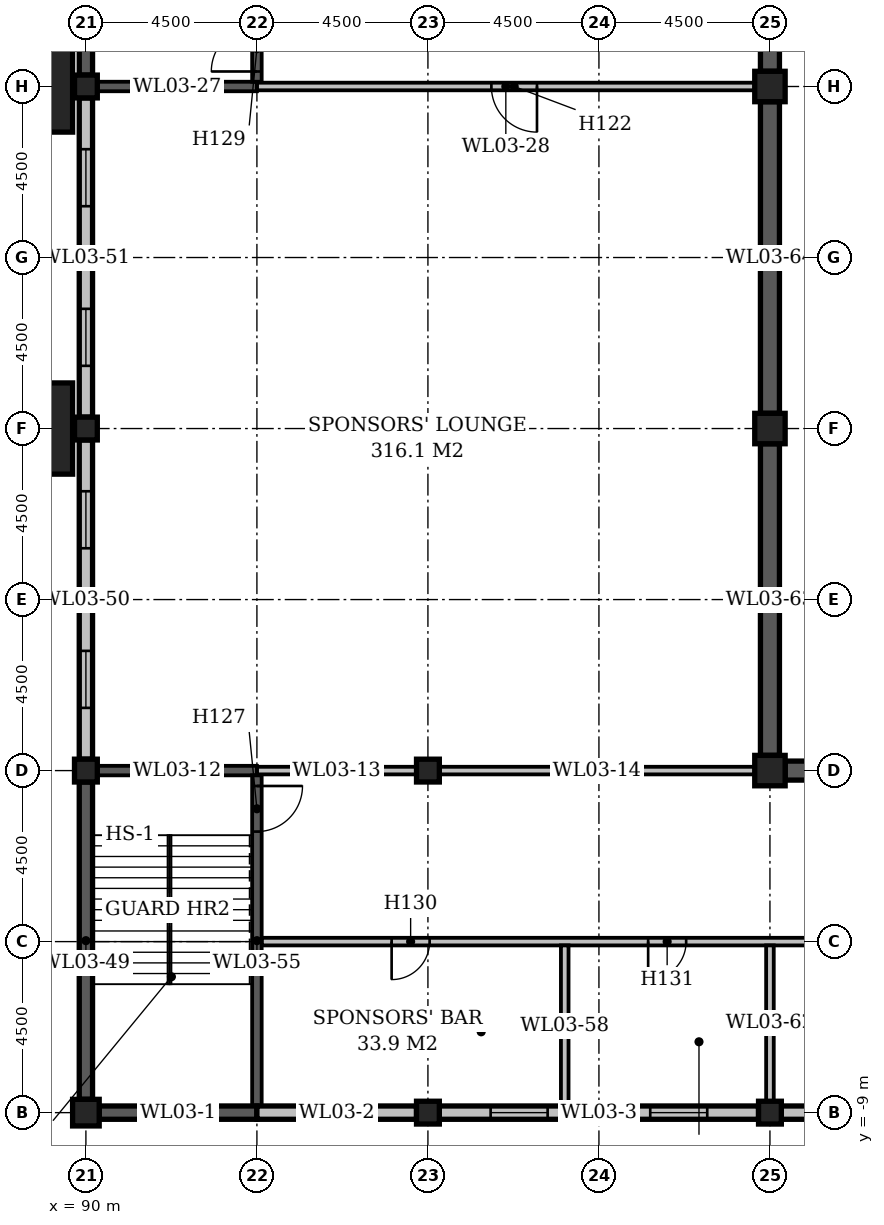
"""IFC4 building model, lengths in metres.
Left out: names, types, materials, properties, quantities, classifications, styles, units other than length and angle.
Written with IfcOpenShell. Run it as: python <this file> out.ifc"""

import sys

from ifc_helpers import new_model, si_unit, direction, frame, frame_2d, origin, origin_2d, place, context, subcontext, project, spatial, rectangle, extrude, element, fill, save


model = new_model("IFC4")
c1 = context("Model", 3, precision=1e-05, world=origin(), true_north=direction((0.0, 1.0)))
c2 = subcontext(c1, "Body", "Model", "MODEL_VIEW")
j1 = project(units=[si_unit("LENGTHUNIT", "METRE"), si_unit("PLANEANGLEUNIT", "RADIAN")], contexts=[c1])
p1 = place(None, origin())
s1 = spatial("IfcSite", under=j1, at=p1, CompositionType="ELEMENT")
p2 = place(p1, origin())
s2 = spatial("IfcBuilding", under=s1, at=p2, CompositionType="ELEMENT")
p3 = place(p2, frame((0.0, 0.0, 19.0)))
s3 = spatial("IfcBuildingStorey", under=s2, at=p3, CompositionType="ELEMENT", Elevation=19.0)
p4 = place(p3, frame((90.0, -9.0, 0.0), z_axis=(0.0, 0.0, 1.0), x_axis=(1.0, 0.0, 0.0)))
e1 = element("IfcColumn", 1, at=p4, inside=s3, PredefinedType="COLUMN", context=c2, shape_type="SweptSolid", body=[
    extrude(rectangle(XDim=0.7, YDim=0.7, at=origin_2d()), origin(), (0.0, 0.0, 1.0), 4.7),
])
for number, where, z_axis, x_axis in (
    (2, (90.0, 0.0, 0.0), (0.0, 0.0, 1.0), (1.0, 0.0, 0.0)),
    (3, (90.0, 9.0, 0.0), (0.0, 0.0, 1.0), (1.0, 0.0, 0.0)),
    (4, (90.0, 18.0, 0.0), (0.0, 0.0, 1.0), (1.0, 0.0, 0.0)),
    (5, (99.0, -9.0, 0.0), (0.0, 0.0, 1.0), (1.0, 0.0, 0.0)),
    (6, (99.0, 0.0, 0.0), (0.0, 0.0, 1.0), (1.0, 0.0, 0.0)),
    (7, (108.0, -9.0, 0.0), (0.0, 0.0, 1.0), (1.0, 0.0, 0.0)),
):
    element("IfcColumn", number, at=place(p3, frame(where, z_axis=z_axis, x_axis=x_axis)), inside=s3, PredefinedType="COLUMN", context=c2, shape_type="SweptSolid", body=[
        extrude(rectangle(XDim=0.6, YDim=0.6, at=origin_2d()), origin(), (0.0, 0.0, 1.0), 4.7),
    ])
for number, where, z_axis, x_axis in (
    (8, (108.0, 0.0, -0.3), (0.0, 0.0, 1.0), (1.0, 0.0, 0.0)),
    (9, (108.0, 9.0, -0.3), (0.0, 0.0, 1.0), (1.0, 0.0, 0.0)),
    (10, (108.0, 18.0, -0.3), (0.0, 0.0, 1.0), (1.0, 0.0, 0.0)),
):
    element("IfcColumn", number, at=place(p3, frame(where, z_axis=z_axis, x_axis=x_axis)), inside=s3, PredefinedType="COLUMN", context=c2, shape_type="SweptSolid", body=[
        extrude(rectangle(XDim=0.8, YDim=0.8, at=origin_2d()), origin(), (0.0, 0.0, 1.0), 5.0),
    ])
p5 = place(p3, frame((90.35, -9.0, 0.0), z_axis=(0.0, 0.0, 1.0), x_axis=(1.0, 0.0, 0.0)))
e11 = element("IfcWall", 11, at=p5, inside=s3, PredefinedType="STANDARD", context=c2, shape_type="SweptSolid", body=[
    extrude(rectangle(XDim=4.15, YDim=0.35, at=frame_2d((2.075, 0.0))), origin(), (0.0, 0.0, 1.0), 5.0),
])
p6 = place(p3, frame((94.5, -9.0, 0.0), z_axis=(0.0, 0.0, 1.0), x_axis=(1.0, 0.0, 0.0)))
e12 = element("IfcWall", 12, at=p6, inside=s3, PredefinedType="STANDARD", context=c2, shape_type="SweptSolid", body=[
    extrude(rectangle(XDim=4.2, YDim=0.35, at=frame_2d((2.1, 0.0))), origin(), (0.0, 0.0, 1.0), 4.1),
])
p7 = place(p6, frame((1.35, 0.0, 1.0)))
e13 = element("IfcOpeningElement", 13, at=p7, cuts=e12, PredefinedType="OPENING", context=c2, shape_type="SweptSolid", body=[
    extrude(rectangle(XDim=1.5, YDim=2.4, at=frame_2d((0.75, 1.2))), frame((0.0, 0.187, 0.0), z_axis=(0.0, -1.0, 0.0), x_axis=(1.0, 0.0, 0.0)), (0.0, 0.0, 1.0), 0.374),
])
p8 = place(p3, frame((99.3, -9.0, 0.0), z_axis=(0.0, 0.0, 1.0), x_axis=(1.0, 0.0, 0.0)))
e14 = element("IfcWall", 14, at=p8, inside=s3, PredefinedType="STANDARD", context=c2, shape_type="SweptSolid", body=[
    extrude(rectangle(XDim=8.4, YDim=0.35, at=frame_2d((4.2, 0.0))), origin(), (0.0, 0.0, 1.0), 4.1),
])
p9 = place(p8, frame((1.35, 0.0, 1.0)))
e15 = element("IfcOpeningElement", 15, at=p9, cuts=e14, PredefinedType="OPENING", context=c2, shape_type="SweptSolid", body=[
    extrude(rectangle(XDim=1.5, YDim=2.4, at=frame_2d((0.75, 1.2))), frame((0.0, 0.187, 0.0), z_axis=(0.0, -1.0, 0.0), x_axis=(1.0, 0.0, 0.0)), (0.0, 0.0, 1.0), 0.374),
])
p10 = place(p8, frame((5.55, 0.0, 1.0)))
e16 = element("IfcOpeningElement", 16, at=p10, cuts=e14, PredefinedType="OPENING", context=c2, shape_type="SweptSolid", body=[
    extrude(rectangle(XDim=1.5, YDim=2.4, at=frame_2d((0.75, 1.2))), frame((0.0, 0.187, 0.0), z_axis=(0.0, -1.0, 0.0), x_axis=(1.0, 0.0, 0.0)), (0.0, 0.0, 1.0), 0.374),
])
p11 = place(p3, frame((108.3, -9.0, 0.0), z_axis=(0.0, 0.0, 1.0), x_axis=(1.0, 0.0, 0.0)))
e17 = element("IfcWall", 17, at=p11, inside=s3, PredefinedType="STANDARD", context=c2, shape_type="SweptSolid", body=[
    extrude(rectangle(XDim=8.4, YDim=0.35, at=frame_2d((4.2, 0.0))), origin(), (0.0, 0.0, 1.0), 4.1),
])
p12 = place(p11, frame((1.35, 0.0, 1.0)))
e18 = element("IfcOpeningElement", 18, at=p12, cuts=e17, PredefinedType="OPENING", context=c2, shape_type="SweptSolid", body=[
    extrude(rectangle(XDim=1.5, YDim=2.4, at=frame_2d((0.75, 1.2))), frame((0.0, 0.187, 0.0), z_axis=(0.0, -1.0, 0.0), x_axis=(1.0, 0.0, 0.0)), (0.0, 0.0, 1.0), 0.374),
])
p13 = place(p11, frame((5.55, 0.0, 1.0)))
e19 = element("IfcOpeningElement", 19, at=p13, cuts=e17, PredefinedType="OPENING", context=c2, shape_type="SweptSolid", body=[
    extrude(rectangle(XDim=1.5, YDim=2.4, at=frame_2d((0.75, 1.2))), frame((0.0, 0.187, 0.0), z_axis=(0.0, -1.0, 0.0), x_axis=(1.0, 0.0, 0.0)), (0.0, 0.0, 1.0), 0.374),
])
p14 = place(p3, frame((94.625, -4.5, 0.0), z_axis=(0.0, 0.0, 1.0), x_axis=(1.0, 0.0, 0.0)))
e20 = element("IfcWall", 20, at=p14, inside=s3, PredefinedType="STANDARD", context=c2, shape_type="SweptSolid", body=[
    extrude(rectangle(XDim=44.875, YDim=0.2, at=frame_2d((22.438, 0.0))), origin(), (0.0, 0.0, 1.0), 4.7),
])
p15 = place(p14, frame((3.42, 0.0, 0.0)))
e21 = element("IfcOpeningElement", 21, at=p15, cuts=e20, PredefinedType="OPENING", context=c2, shape_type="SweptSolid", body=[
    extrude(rectangle(XDim=1.0, YDim=2.1, at=frame_2d((0.5, 1.05))), frame((0.0, 0.112, 0.0), z_axis=(0.0, -1.0, 0.0), x_axis=(1.0, 0.0, 0.0)), (0.0, 0.0, 1.0), 0.224),
])
p16 = place(p14, frame((10.17, 0.0, 0.0)))
e22 = element("IfcOpeningElement", 22, at=p16, cuts=e20, PredefinedType="OPENING", context=c2, shape_type="SweptSolid", body=[
    extrude(rectangle(XDim=1.0, YDim=2.1, at=frame_2d((0.5, 1.05))), frame((0.0, 0.112, 0.0), z_axis=(0.0, -1.0, 0.0), x_axis=(1.0, 0.0, 0.0)), (0.0, 0.0, 1.0), 0.224),
])
p17 = place(p14, frame((17.17, 0.0, 0.0)))
e23 = element("IfcOpeningElement", 23, at=p17, cuts=e20, PredefinedType="OPENING", context=c2, shape_type="SweptSolid", body=[
    extrude(rectangle(XDim=1.0, YDim=2.1, at=frame_2d((0.5, 1.05))), frame((0.0, 0.112, 0.0), z_axis=(0.0, -1.0, 0.0), x_axis=(1.0, 0.0, 0.0)), (0.0, 0.0, 1.0), 0.224),
])
p18 = place(p14, frame((24.82, 0.0, 0.0)))
e24 = element("IfcOpeningElement", 24, at=p18, cuts=e20, PredefinedType="OPENING", context=c2, shape_type="SweptSolid", body=[
    extrude(rectangle(XDim=1.0, YDim=2.1, at=frame_2d((0.5, 1.05))), frame((0.0, 0.112, 0.0), z_axis=(0.0, -1.0, 0.0), x_axis=(1.0, 0.0, 0.0)), (0.0, 0.0, 1.0), 0.224),
])
p19 = place(p14, frame((29.37, 0.0, 0.0)))
e25 = element("IfcOpeningElement", 25, at=p19, cuts=e20, PredefinedType="OPENING", context=c2, shape_type="SweptSolid", body=[
    extrude(rectangle(XDim=1.0, YDim=2.1, at=frame_2d((0.5, 1.05))), frame((0.0, 0.112, 0.0), z_axis=(0.0, -1.0, 0.0), x_axis=(1.0, 0.0, 0.0)), (0.0, 0.0, 1.0), 0.224),
])
p20 = place(p14, frame((33.87, 0.0, 0.0)))
e26 = element("IfcOpeningElement", 26, at=p20, cuts=e20, PredefinedType="OPENING", context=c2, shape_type="SweptSolid", body=[
    extrude(rectangle(XDim=1.0, YDim=2.1, at=frame_2d((0.5, 1.05))), frame((0.0, 0.112, 0.0), z_axis=(0.0, -1.0, 0.0), x_axis=(1.0, 0.0, 0.0)), (0.0, 0.0, 1.0), 0.224),
])
p21 = place(p14, frame((38.52, 0.0, 0.0)))
e27 = element("IfcOpeningElement", 27, at=p21, cuts=e20, PredefinedType="OPENING", context=c2, shape_type="SweptSolid", body=[
    extrude(rectangle(XDim=1.0, YDim=2.1, at=frame_2d((0.5, 1.05))), frame((0.0, 0.112, 0.0), z_axis=(0.0, -1.0, 0.0), x_axis=(1.0, 0.0, 0.0)), (0.0, 0.0, 1.0), 0.224),
])
p22 = place(p3, frame((90.3, 0.0, 0.0), z_axis=(0.0, 0.0, 1.0), x_axis=(1.0, 0.0, 0.0)))
e28 = element("IfcWall", 28, at=p22, inside=s3, PredefinedType="STANDARD", context=c2, shape_type="SweptSolid", body=[
    extrude(rectangle(XDim=4.2, YDim=0.25, at=frame_2d((2.1, 0.0))), origin(), (0.0, 0.0, 1.0), 5.0),
])
p23 = place(p3, frame((94.5, 0.0, 0.0), z_axis=(0.0, 0.0, 1.0), x_axis=(1.0, 0.0, 0.0)))
e29 = element("IfcWall", 29, at=p23, inside=s3, PredefinedType="STANDARD", context=c2, shape_type="SweptSolid", body=[
    extrude(rectangle(XDim=4.2, YDim=0.2, at=frame_2d((2.1, 0.0))), origin(), (0.0, 0.0, 1.0), 4.7),
])
p24 = place(p3, frame((99.3, 0.0, 0.0), z_axis=(0.0, 0.0, 1.0), x_axis=(1.0, 0.0, 0.0)))
e30 = element("IfcWall", 30, at=p24, inside=s3, PredefinedType="STANDARD", context=c2, shape_type="SweptSolid", body=[
    extrude(rectangle(XDim=8.3, YDim=0.2, at=frame_2d((4.15, 0.0))), origin(), (0.0, 0.0, 1.0), 4.7),
])
p25 = place(p3, frame((108.4, 0.0, 0.0), z_axis=(0.0, 0.0, 1.0), x_axis=(1.0, 0.0, 0.0)))
e31 = element("IfcWall", 31, at=p25, inside=s3, PredefinedType="STANDARD", context=c2, shape_type="SweptSolid", body=[
    extrude(rectangle(XDim=8.3, YDim=0.5, at=frame_2d((4.15, 0.0))), origin(), (0.0, 0.0, 1.0), 5.0),
])
p26 = place(p25, frame((4.72, 0.0, 0.0)))
e32 = element("IfcOpeningElement", 32, at=p26, cuts=e31, PredefinedType="OPENING", context=c2, shape_type="SweptSolid", body=[
    extrude(rectangle(XDim=1.8, YDim=2.4, at=frame_2d((0.9, 1.2))), frame((0.0, 0.262, 0.0), z_axis=(0.0, -1.0, 0.0), x_axis=(1.0, 0.0, 0.0)), (0.0, 0.0, 1.0), 0.524),
])
p27 = place(p3, frame((90.3, 18.0, 0.0), z_axis=(0.0, 0.0, 1.0), x_axis=(1.0, 0.0, 0.0)))
e33 = element("IfcWall", 33, at=p27, inside=s3, PredefinedType="STANDARD", context=c2, shape_type="SweptSolid", body=[
    extrude(rectangle(XDim=4.2, YDim=0.25, at=frame_2d((2.1, 0.0))), origin(), (0.0, 0.0, 1.0), 5.0),
])
p28 = place(p3, frame((94.5, 18.0, 0.0), z_axis=(0.0, 0.0, 1.0), x_axis=(1.0, 0.0, 0.0)))
e34 = element("IfcWall", 34, at=p28, inside=s3, PredefinedType="STANDARD", context=c2, shape_type="SweptSolid", body=[
    extrude(rectangle(XDim=13.1, YDim=0.2, at=frame_2d((6.55, 0.0))), origin(), (0.0, 0.0, 1.0), 3.3),
])
p29 = place(p28, frame((6.17, 0.0, 0.0)))
e35 = element("IfcOpeningElement", 35, at=p29, cuts=e34, PredefinedType="OPENING", context=c2, shape_type="SweptSolid", body=[
    extrude(rectangle(XDim=1.2, YDim=2.1, at=frame_2d((0.6, 1.05))), frame((0.0, 0.112, 0.0), z_axis=(0.0, -1.0, 0.0), x_axis=(1.0, 0.0, 0.0)), (0.0, 0.0, 1.0), 0.224),
])
p30 = place(p3, frame((90.0, -8.65, 0.0), z_axis=(0.0, 0.0, 1.0), x_axis=(0.0, 1.0, 0.0)))
e36 = element("IfcWall", 36, at=p30, inside=s3, PredefinedType="STANDARD", context=c2, shape_type="SweptSolid", body=[
    extrude(rectangle(XDim=8.35, YDim=0.35, at=frame_2d((4.175, 0.0))), origin(), (0.0, 0.0, 1.0), 5.0),
])
p31 = place(p3, frame((90.0, 0.3, 0.0), z_axis=(0.0, 0.0, 1.0), x_axis=(0.0, 1.0, 0.0)))
e37 = element("IfcWall", 37, at=p31, inside=s3, PredefinedType="STANDARD", context=c2, shape_type="SweptSolid", body=[
    extrude(rectangle(XDim=8.4, YDim=0.35, at=frame_2d((4.2, 0.0))), origin(), (0.0, 0.0, 1.0), 4.1),
])
p32 = place(p31, frame((1.35, 0.0, 1.0)))
e38 = element("IfcOpeningElement", 38, at=p32, cuts=e37, PredefinedType="OPENING", context=c2, shape_type="SweptSolid", body=[
    extrude(rectangle(XDim=1.5, YDim=2.4, at=frame_2d((0.75, 1.2))), frame((0.0, 0.187, 0.0), z_axis=(0.0, -1.0, 0.0), x_axis=(1.0, 0.0, 0.0)), (0.0, 0.0, 1.0), 0.374),
])
p33 = place(p31, frame((5.55, 0.0, 1.0)))
e39 = element("IfcOpeningElement", 39, at=p33, cuts=e37, PredefinedType="OPENING", context=c2, shape_type="SweptSolid", body=[
    extrude(rectangle(XDim=1.5, YDim=2.4, at=frame_2d((0.75, 1.2))), frame((0.0, 0.187, 0.0), z_axis=(0.0, -1.0, 0.0), x_axis=(1.0, 0.0, 0.0)), (0.0, 0.0, 1.0), 0.374),
])
p34 = place(p3, frame((90.0, 9.3, 0.0), z_axis=(0.0, 0.0, 1.0), x_axis=(0.0, 1.0, 0.0)))
e40 = element("IfcWall", 40, at=p34, inside=s3, PredefinedType="STANDARD", context=c2, shape_type="SweptSolid", body=[
    extrude(rectangle(XDim=8.4, YDim=0.35, at=frame_2d((4.2, 0.0))), origin(), (0.0, 0.0, 1.0), 4.1),
])
p35 = place(p34, frame((1.35, 0.0, 1.0)))
e41 = element("IfcOpeningElement", 41, at=p35, cuts=e40, PredefinedType="OPENING", context=c2, shape_type="SweptSolid", body=[
    extrude(rectangle(XDim=1.5, YDim=2.4, at=frame_2d((0.75, 1.2))), frame((0.0, 0.187, 0.0), z_axis=(0.0, -1.0, 0.0), x_axis=(1.0, 0.0, 0.0)), (0.0, 0.0, 1.0), 0.374),
])
p36 = place(p34, frame((5.55, 0.0, 1.0)))
e42 = element("IfcOpeningElement", 42, at=p36, cuts=e40, PredefinedType="OPENING", context=c2, shape_type="SweptSolid", body=[
    extrude(rectangle(XDim=1.5, YDim=2.4, at=frame_2d((0.75, 1.2))), frame((0.0, 0.187, 0.0), z_axis=(0.0, -1.0, 0.0), x_axis=(1.0, 0.0, 0.0)), (0.0, 0.0, 1.0), 0.374),
])
p37 = place(p3, frame((90.0, 18.3, 0.0), z_axis=(0.0, 0.0, 1.0), x_axis=(0.0, 1.0, 0.0)))
e43 = element("IfcWall", 43, at=p37, inside=s3, PredefinedType="STANDARD", context=c2, shape_type="SweptSolid", body=[
    extrude(rectangle(XDim=8.4, YDim=0.35, at=frame_2d((4.2, 0.0))), origin(), (0.0, 0.0, 1.0), 5.0),
])
p38 = place(p3, frame((94.5, -8.825, 0.0), z_axis=(0.0, 0.0, 1.0), x_axis=(0.0, 1.0, 0.0)))
e44 = element("IfcWall", 44, at=p38, inside=s3, PredefinedType="STANDARD", context=c2, shape_type="SweptSolid", body=[
    extrude(rectangle(XDim=8.7, YDim=0.25, at=frame_2d((4.35, 0.0))), origin(), (0.0, 0.0, 1.0), 5.0),
])
p39 = place(p38, frame((7.22, 0.0, 0.0)))
e45 = element("IfcOpeningElement", 45, at=p39, cuts=e44, PredefinedType="OPENING", context=c2, shape_type="SweptSolid", body=[
    extrude(rectangle(XDim=1.2, YDim=2.1, at=frame_2d((0.6, 1.05))), frame((0.0, 0.137, 0.0), z_axis=(0.0, -1.0, 0.0), x_axis=(1.0, 0.0, 0.0)), (0.0, 0.0, 1.0), 0.274),
])
p40 = place(p3, frame((94.5, 18.125, 0.0), z_axis=(0.0, 0.0, 1.0), x_axis=(0.0, 1.0, 0.0)))
e46 = element("IfcWall", 46, at=p40, inside=s3, PredefinedType="STANDARD", context=c2, shape_type="SweptSolid", body=[
    extrude(rectangle(XDim=8.75, YDim=0.25, at=frame_2d((4.375, 0.0))), origin(), (0.0, 0.0, 1.0), 5.0),
])
p41 = place(p40, frame((0.27, 0.0, 0.0)))
e47 = element("IfcOpeningElement", 47, at=p41, cuts=e46, PredefinedType="OPENING", context=c2, shape_type="SweptSolid", body=[
    extrude(rectangle(XDim=1.2, YDim=2.1, at=frame_2d((0.6, 1.05))), frame((0.0, 0.137, 0.0), z_axis=(0.0, -1.0, 0.0), x_axis=(1.0, 0.0, 0.0)), (0.0, 0.0, 1.0), 0.274),
])
p42 = place(p3, frame((102.6, -8.825, 0.0), z_axis=(0.0, 0.0, 1.0), x_axis=(0.0, 1.0, 0.0)))
e48 = element("IfcWall", 48, at=p42, inside=s3, PredefinedType="STANDARD", context=c2, shape_type="SweptSolid", body=[
    extrude(rectangle(XDim=4.225, YDim=0.2, at=frame_2d((2.112, 0.0))), origin(), (0.0, 0.0, 1.0), 4.7),
])
p43 = place(p3, frame((108.0, -8.7, 0.0), z_axis=(0.0, 0.0, 1.0), x_axis=(0.0, 1.0, 0.0)))
e49 = element("IfcWall", 49, at=p43, inside=s3, PredefinedType="STANDARD", context=c2, shape_type="SweptSolid", body=[
    extrude(rectangle(XDim=4.1, YDim=0.2, at=frame_2d((2.05, 0.0))), origin(), (0.0, 0.0, 1.0), 4.7),
])
for number, where, z_axis, x_axis in (
    (50, (108.0, 0.4, 0.0), (0.0, 0.0, 1.0), (0.0, 1.0, 0.0)),
    (51, (108.0, 9.4, 0.0), (0.0, 0.0, 1.0), (0.0, 1.0, 0.0)),
):
    element("IfcWall", number, at=place(p3, frame(where, z_axis=z_axis, x_axis=x_axis)), inside=s3, PredefinedType="STANDARD", context=c2, shape_type="SweptSolid", body=[
        extrude(rectangle(XDim=8.2, YDim=0.5, at=frame_2d((4.1, 0.0))), origin(), (0.0, 0.0, 1.0), 5.0),
    ])
p44 = place(p3, frame((108.0, 18.4, 0.0), z_axis=(0.0, 0.0, 1.0), x_axis=(0.0, 1.0, 0.0)))
e52 = element("IfcWall", 52, at=p44, inside=s3, PredefinedType="STANDARD", context=c2, shape_type="SweptSolid", body=[
    extrude(rectangle(XDim=8.2, YDim=0.5, at=frame_2d((4.1, 0.0))), origin(), (0.0, 0.0, 1.0), 5.0),
])
p45 = place(p44, frame((3.22, 0.0, 0.0)))
e53 = element("IfcOpeningElement", 53, at=p45, cuts=e52, PredefinedType="OPENING", context=c2, shape_type="SweptSolid", body=[
    extrude(rectangle(XDim=1.8, YDim=2.4, at=frame_2d((0.9, 1.2))), frame((0.0, 0.262, 0.0), z_axis=(0.0, -1.0, 0.0), x_axis=(1.0, 0.0, 0.0)), (0.0, 0.0, 1.0), 0.524),
])
for number, where, z_axis, x_axis in (
    (54, (88.85, 9.0, 0.0), (0.0, 0.0, 1.0), (1.0, 0.0, 0.0)),
    (55, (88.85, 18.0, 0.0), (0.0, 0.0, 1.0), (1.0, 0.0, 0.0)),
):
    element("IfcColumn", number, at=place(p3, frame(where, z_axis=z_axis, x_axis=x_axis)), inside=s3, PredefinedType="COLUMN", context=c2, shape_type="SweptSolid", body=[
        extrude(rectangle(XDim=1.6, YDim=2.4, at=origin_2d()), origin(), (0.0, 0.0, 1.0), 5.0),
    ])
p46 = place(p29, origin())
e56 = element("IfcDoor", 56, at=p46, inside=s3, OperationType="SINGLE_SWING_RIGHT", PredefinedType="DOOR", context=c2, shape_type="SweptSolid", body=[
    extrude(rectangle(XDim=1.2, YDim=2.1, at=frame_2d((0.6, 1.05))), frame((0.0, 0.025, 0.0), z_axis=(0.0, -1.0, 0.0), x_axis=(1.0, 0.0, 0.0)), (0.0, 0.0, 1.0), 0.05),
])
fill(e35, e56)
p47 = place(p39, origin())
e57 = element("IfcDoor", 57, at=p47, inside=s3, OperationType="SINGLE_SWING_RIGHT", PredefinedType="DOOR", context=c2, shape_type="SweptSolid", body=[
    extrude(rectangle(XDim=1.2, YDim=2.1, at=frame_2d((0.6, 1.05))), frame((0.0, 0.025, 0.0), z_axis=(0.0, -1.0, 0.0), x_axis=(1.0, 0.0, 0.0)), (0.0, 0.0, 1.0), 0.05),
])
fill(e45, e57)
p48 = place(p41, origin())
e58 = element("IfcDoor", 58, at=p48, inside=s3, OperationType="SINGLE_SWING_LEFT", PredefinedType="DOOR", context=c2, shape_type="SweptSolid", body=[
    extrude(rectangle(XDim=1.2, YDim=2.1, at=frame_2d((0.6, 1.05))), frame((0.0, 0.025, 0.0), z_axis=(0.0, -1.0, 0.0), x_axis=(1.0, 0.0, 0.0)), (0.0, 0.0, 1.0), 0.05),
])
fill(e47, e58)
p49 = place(p15, frame((1.0, 0.0, 0.0), z_axis=(0.0, 0.0, 1.0), x_axis=(-1.0, 0.0, 0.0)))
e59 = element("IfcDoor", 59, at=p49, inside=s3, OperationType="SINGLE_SWING_RIGHT", PredefinedType="DOOR", context=c2, shape_type="SweptSolid", body=[
    extrude(rectangle(XDim=1.0, YDim=2.1, at=frame_2d((0.5, 1.05))), frame((0.0, 0.025, 0.0), z_axis=(0.0, -1.0, 0.0), x_axis=(1.0, 0.0, 0.0)), (0.0, 0.0, 1.0), 0.05),
])
fill(e21, e59)
p50 = place(p16, frame((1.0, 0.0, 0.0), z_axis=(0.0, 0.0, 1.0), x_axis=(-1.0, 0.0, 0.0)))
e60 = element("IfcDoor", 60, at=p50, inside=s3, OperationType="SINGLE_SWING_RIGHT", PredefinedType="DOOR", context=c2, shape_type="SweptSolid", body=[
    extrude(rectangle(XDim=1.0, YDim=2.1, at=frame_2d((0.5, 1.05))), frame((0.0, 0.025, 0.0), z_axis=(0.0, -1.0, 0.0), x_axis=(1.0, 0.0, 0.0)), (0.0, 0.0, 1.0), 0.05),
])
fill(e22, e60)
p51 = place(p7, origin())
e61 = element("IfcWindow", 61, at=p51, inside=s3, PartitioningType="SINGLE_PANEL", PredefinedType="WINDOW", context=c2, shape_type="SweptSolid", body=[
    extrude(rectangle(XDim=1.5, YDim=2.4, at=frame_2d((0.75, 1.2))), frame((0.0, 0.03, 0.0), z_axis=(0.0, -1.0, 0.0), x_axis=(1.0, 0.0, 0.0)), (0.0, 0.0, 1.0), 0.06),
])
fill(e13, e61)
p52 = place(p9, origin())
e62 = element("IfcWindow", 62, at=p52, inside=s3, PartitioningType="SINGLE_PANEL", PredefinedType="WINDOW", context=c2, shape_type="SweptSolid", body=[
    extrude(rectangle(XDim=1.5, YDim=2.4, at=frame_2d((0.75, 1.2))), frame((0.0, 0.03, 0.0), z_axis=(0.0, -1.0, 0.0), x_axis=(1.0, 0.0, 0.0)), (0.0, 0.0, 1.0), 0.06),
])
fill(e15, e62)
p53 = place(p10, origin())
e63 = element("IfcWindow", 63, at=p53, inside=s3, PartitioningType="SINGLE_PANEL", PredefinedType="WINDOW", context=c2, shape_type="SweptSolid", body=[
    extrude(rectangle(XDim=1.5, YDim=2.4, at=frame_2d((0.75, 1.2))), frame((0.0, 0.03, 0.0), z_axis=(0.0, -1.0, 0.0), x_axis=(1.0, 0.0, 0.0)), (0.0, 0.0, 1.0), 0.06),
])
fill(e16, e63)
p54 = place(p32, origin())
e64 = element("IfcWindow", 64, at=p54, inside=s3, PartitioningType="SINGLE_PANEL", PredefinedType="WINDOW", context=c2, shape_type="SweptSolid", body=[
    extrude(rectangle(XDim=1.5, YDim=2.4, at=frame_2d((0.75, 1.2))), frame((0.0, 0.03, 0.0), z_axis=(0.0, -1.0, 0.0), x_axis=(1.0, 0.0, 0.0)), (0.0, 0.0, 1.0), 0.06),
])
fill(e38, e64)
p55 = place(p33, origin())
e65 = element("IfcWindow", 65, at=p55, inside=s3, PartitioningType="SINGLE_PANEL", PredefinedType="WINDOW", context=c2, shape_type="SweptSolid", body=[
    extrude(rectangle(XDim=1.5, YDim=2.4, at=frame_2d((0.75, 1.2))), frame((0.0, 0.03, 0.0), z_axis=(0.0, -1.0, 0.0), x_axis=(1.0, 0.0, 0.0)), (0.0, 0.0, 1.0), 0.06),
])
fill(e39, e65)
p56 = place(p35, origin())
e66 = element("IfcWindow", 66, at=p56, inside=s3, PartitioningType="SINGLE_PANEL", PredefinedType="WINDOW", context=c2, shape_type="SweptSolid", body=[
    extrude(rectangle(XDim=1.5, YDim=2.4, at=frame_2d((0.75, 1.2))), frame((0.0, 0.03, 0.0), z_axis=(0.0, -1.0, 0.0), x_axis=(1.0, 0.0, 0.0)), (0.0, 0.0, 1.0), 0.06),
])
fill(e41, e66)
p57 = place(p36, origin())
e67 = element("IfcWindow", 67, at=p57, inside=s3, PartitioningType="SINGLE_PANEL", PredefinedType="WINDOW", context=c2, shape_type="SweptSolid", body=[
    extrude(rectangle(XDim=1.5, YDim=2.4, at=frame_2d((0.75, 1.2))), frame((0.0, 0.03, 0.0), z_axis=(0.0, -1.0, 0.0), x_axis=(1.0, 0.0, 0.0)), (0.0, 0.0, 1.0), 0.06),
])
fill(e42, e67)
save(model, sys.argv[1])
